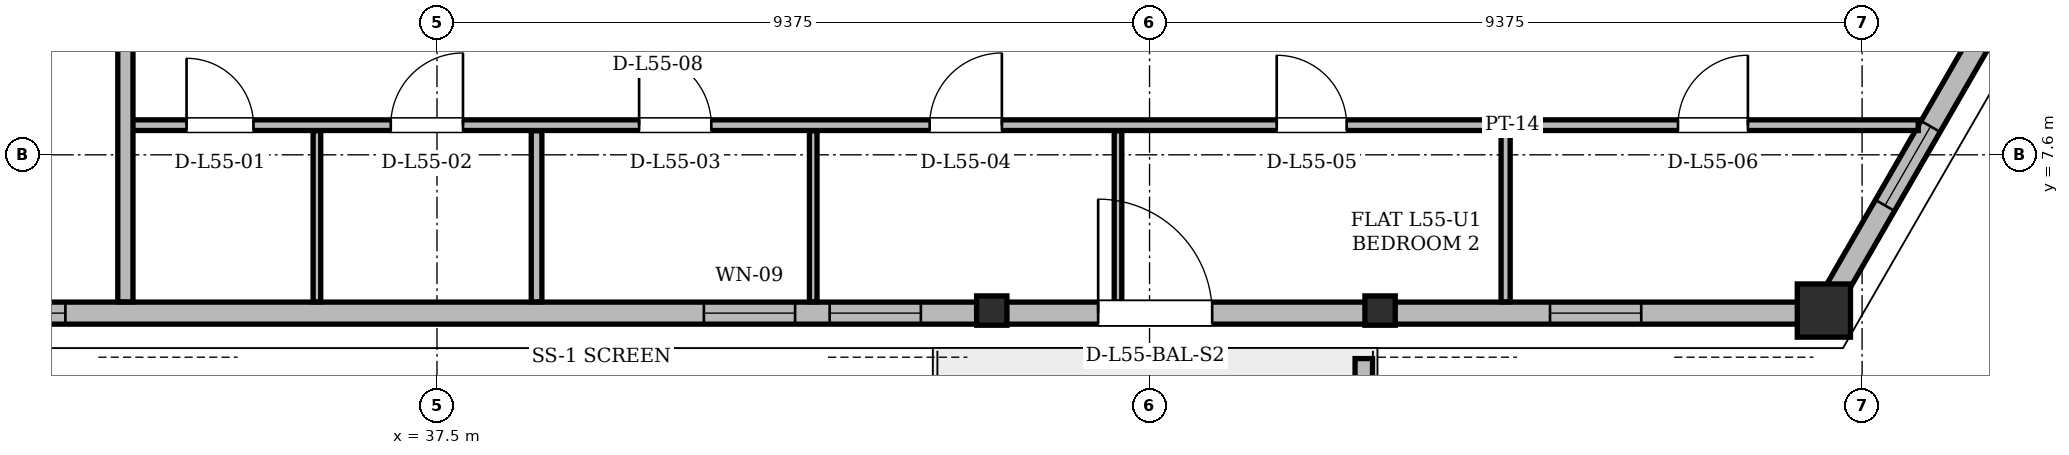
"""IFC4 building model, lengths in metres.
Left out: names, types, materials, properties, quantities, classifications, styles, units other than length and angle.
Written with IfcOpenShell. Run it as: python <this file> out.ifc"""

import sys

from ifc_helpers import new_model, si_unit, direction, frame, frame_2d, origin, origin_2d, place, context, subcontext, project, spatial, polyline, rectangle, hollow_rectangle, i_section, outline, extrude, element, fill, save


model = new_model("IFC4")
c1 = context("Model", 3, precision=1e-05, world=origin(), true_north=direction((0.0, 1.0)))
c2 = subcontext(c1, "Body", "Model", "MODEL_VIEW")
j1 = project(units=[si_unit("LENGTHUNIT", "METRE"), si_unit("PLANEANGLEUNIT", "RADIAN")], contexts=[c1])
p1 = place(None, origin())
s1 = spatial("IfcSite", under=j1, at=p1, CompositionType="ELEMENT")
p2 = place(p1, origin())
s2 = spatial("IfcBuilding", under=s1, at=p2, CompositionType="ELEMENT")
p3 = place(p2, frame((0.0, 0.0, 209.1)))
s3 = spatial("IfcBuildingStorey", under=s2, at=p3, CompositionType="ELEMENT", Elevation=209.1)
p4 = place(p3, frame((55.733, 5.517, 0.004), z_axis=(0.007884695021, 0.01876013643, 0.999792922992), x_axis=(-0.921886676673, 0.387459617732, 0.0)))
e1 = element("IfcColumn", 1, at=p4, inside=s3, PredefinedType="COLUMN", context=c2, shape_type="SweptSolid", body=[
    extrude(hollow_rectangle(XDim=0.7, YDim=0.7, WallThickness=0.055, at=origin_2d()), origin(), (0.0, 0.0, 1.0), 3.592),
])
for number, where, z_axis, x_axis in (
    (2, (44.793, 5.517, 0.004), (0.003, 0.019, 1.0), (-0.986, 0.168, 0.0)),
    (3, (49.899, 5.517, 0.004), (0.005, 0.019, 1.0), (-0.962, 0.272, 0.0)),
):
    element("IfcColumn", number, at=place(p3, frame(where, z_axis=z_axis, x_axis=x_axis)), inside=s3, PredefinedType="COLUMN", context=c2, shape_type="SweptSolid", body=[
        extrude(i_section(OverallWidth=0.399, OverallDepth=0.386, WebThickness=0.021, FlangeThickness=0.033, at=origin_2d()), origin(), (0.0, 0.0, 1.0), 3.592),
    ])
p5 = place(p3, frame((19.267, 5.517, 0.0), z_axis=(0.0, 0.0, 1.0), x_axis=(1.0, 0.0, 0.0)))
e4 = element("IfcWall", 4, at=p5, inside=s3, PredefinedType="SOLIDWALL", context=c2, shape_type="SweptSolid", body=[
    extrude(rectangle(XDim=36.466, YDim=0.29, at=frame_2d((18.233, 0.0))), origin(), (0.0, 0.0, 1.0), 2.677),
])
p6 = place(p5, frame((3.639, 0.0, 0.0)))
e5 = element("IfcOpeningElement", 5, at=p6, cuts=e4, PredefinedType="OPENING", context=c2, shape_type="SweptSolid", body=[
    extrude(rectangle(XDim=1.5, YDim=2.2, at=frame_2d((0.75, 1.1))), frame((0.0, 0.145, 0.0), z_axis=(0.0, -1.0, 0.0), x_axis=(1.0, 0.0, 0.0)), (0.0, 0.0, 1.0), 0.29),
])
p7 = place(p5, frame((26.932, 0.0, 0.0)))
e6 = element("IfcOpeningElement", 6, at=p7, cuts=e4, PredefinedType="OPENING", context=c2, shape_type="SweptSolid", body=[
    extrude(rectangle(XDim=1.5, YDim=2.2, at=frame_2d((0.75, 1.1))), frame((0.0, 0.145, 0.0), z_axis=(0.0, -1.0, 0.0), x_axis=(1.0, 0.0, 0.0)), (0.0, 0.0, 1.0), 0.29),
])
p8 = place(p5, frame((21.745, 0.0, 0.85)))
e7 = element("IfcOpeningElement", 7, at=p8, cuts=e4, PredefinedType="OPENING", context=c2, shape_type="SweptSolid", body=[
    extrude(rectangle(XDim=1.2, YDim=1.48, at=frame_2d((0.6, 0.74))), frame((0.0, 0.145, 0.0), z_axis=(0.0, -1.0, 0.0), x_axis=(1.0, 0.0, 0.0)), (0.0, 0.0, 1.0), 0.29),
])
p9 = place(p5, frame((23.399, 0.0, 0.85)))
e8 = element("IfcOpeningElement", 8, at=p9, cuts=e4, PredefinedType="OPENING", context=c2, shape_type="SweptSolid", body=[
    extrude(rectangle(XDim=1.2, YDim=1.48, at=frame_2d((0.6, 0.74))), frame((0.0, 0.145, 0.0), z_axis=(0.0, -1.0, 0.0), x_axis=(1.0, 0.0, 0.0)), (0.0, 0.0, 1.0), 0.29),
])
p10 = place(p5, frame((32.877, 0.0, 0.85)))
e9 = element("IfcOpeningElement", 9, at=p10, cuts=e4, PredefinedType="OPENING", context=c2, shape_type="SweptSolid", body=[
    extrude(rectangle(XDim=1.2, YDim=1.48, at=frame_2d((0.6, 0.74))), frame((0.0, 0.145, 0.0), z_axis=(0.0, -1.0, 0.0), x_axis=(1.0, 0.0, 0.0)), (0.0, 0.0, 1.0), 0.29),
])
p11 = place(p5, frame((1.674, 0.0, 0.85)))
e10 = element("IfcOpeningElement", 10, at=p11, cuts=e4, PredefinedType="OPENING", context=c2, shape_type="SweptSolid", body=[
    extrude(rectangle(XDim=1.2, YDim=1.48, at=frame_2d((0.6, 0.74))), frame((0.0, 0.145, 0.0), z_axis=(0.0, -1.0, 0.0), x_axis=(1.0, 0.0, 0.0)), (0.0, 0.0, 1.0), 0.29),
])
p12 = place(p5, frame((12.144, 0.0, 0.85)))
e11 = element("IfcOpeningElement", 11, at=p12, cuts=e4, PredefinedType="OPENING", context=c2, shape_type="SweptSolid", body=[
    extrude(rectangle(XDim=1.2, YDim=1.48, at=frame_2d((0.6, 0.74))), frame((0.0, 0.145, 0.0), z_axis=(0.0, -1.0, 0.0), x_axis=(1.0, 0.0, 0.0)), (0.0, 0.0, 1.0), 0.29),
])
p13 = place(p3, frame((55.733, 5.517, 0.0), z_axis=(0.0, 0.0, 1.0), x_axis=(0.500015274395, 0.866016584929, 0.0)))
e12 = element("IfcWall", 12, at=p13, inside=s3, PredefinedType="SOLIDWALL", context=c2, shape_type="SweptSolid", body=[
    extrude(rectangle(XDim=7.025, YDim=0.29, at=frame_2d((3.512, 0.0))), origin(), (0.0, 0.0, 1.0), 2.677),
])
p14 = place(p13, frame((1.636, 0.0, 0.85)))
e13 = element("IfcOpeningElement", 13, at=p14, cuts=e12, PredefinedType="OPENING", context=c2, shape_type="SweptSolid", body=[
    extrude(rectangle(XDim=1.2, YDim=1.48, at=frame_2d((0.6, 0.74))), frame((0.0, 0.145, 0.0), z_axis=(0.0, -1.0, 0.0), x_axis=(1.0, 0.0, 0.0)), (0.0, 0.0, 1.0), 0.29),
])
p15 = place(p3, frame((49.694, 4.919, 0.0), z_axis=(0.0, 0.0, 1.0), x_axis=(0.0, -1.0, 0.0)))
e14 = element("IfcWall", 14, at=p15, inside=s3, PredefinedType="PARAPET", context=c2, shape_type="SweptSolid", body=[
    extrude(outline(polyline([(0.0, 0.0), (2.042, 0.0), (2.042, 1.1), (0.0, 1.32), (0.0, 0.0)])), frame((0.0, 0.115, 0.0), z_axis=(0.0, -1.0, 0.0), x_axis=(1.0, 0.0, 0.0)), (0.0, 0.0, 1.0), 0.23),
])
p16 = place(p3, frame((33.35, 7.99, 0.0), z_axis=(0.0, 0.0, 1.0), x_axis=(1.0, 0.0, 0.0)))
e15 = element("IfcWall", 15, at=p16, inside=s3, PredefinedType="PARTITIONING", context=c2, shape_type="SweptSolid", body=[
    extrude(rectangle(XDim=23.639, YDim=0.14, at=frame_2d((11.819, 0.0))), origin(), (0.0, 0.0, 1.0), 2.913),
])
p17 = place(p16, frame((0.855, 0.0, 0.0)))
e16 = element("IfcOpeningElement", 16, at=p17, cuts=e15, PredefinedType="OPENING", context=c2, shape_type="SweptSolid", body=[
    extrude(rectangle(XDim=0.88, YDim=2.08, at=frame_2d((0.44, 1.04))), frame((0.0, 0.07, 0.0), z_axis=(0.0, -1.0, 0.0), x_axis=(1.0, 0.0, 0.0)), (0.0, 0.0, 1.0), 0.14),
])
p18 = place(p16, frame((3.542, 0.0, 0.0)))
e17 = element("IfcOpeningElement", 17, at=p18, cuts=e15, PredefinedType="OPENING", context=c2, shape_type="SweptSolid", body=[
    extrude(rectangle(XDim=0.95, YDim=2.1, at=frame_2d((0.475, 1.05))), frame((0.0, 0.07, 0.0), z_axis=(0.0, -1.0, 0.0), x_axis=(1.0, 0.0, 0.0)), (0.0, 0.0, 1.0), 0.14),
])
p19 = place(p16, frame((6.809, 0.0, 0.0)))
e18 = element("IfcOpeningElement", 18, at=p19, cuts=e15, PredefinedType="OPENING", context=c2, shape_type="SweptSolid", body=[
    extrude(rectangle(XDim=0.95, YDim=2.1, at=frame_2d((0.475, 1.05))), frame((0.0, 0.07, 0.0), z_axis=(0.0, -1.0, 0.0), x_axis=(1.0, 0.0, 0.0)), (0.0, 0.0, 1.0), 0.14),
])
p20 = place(p16, frame((10.632, 0.0, 0.0)))
e19 = element("IfcOpeningElement", 19, at=p20, cuts=e15, PredefinedType="OPENING", context=c2, shape_type="SweptSolid", body=[
    extrude(rectangle(XDim=0.95, YDim=2.1, at=frame_2d((0.475, 1.05))), frame((0.0, 0.07, 0.0), z_axis=(0.0, -1.0, 0.0), x_axis=(1.0, 0.0, 0.0)), (0.0, 0.0, 1.0), 0.14),
])
p21 = place(p16, frame((15.198, 0.0, 0.0)))
e20 = element("IfcOpeningElement", 20, at=p21, cuts=e15, PredefinedType="OPENING", context=c2, shape_type="SweptSolid", body=[
    extrude(rectangle(XDim=0.92, YDim=2.12, at=frame_2d((0.46, 1.06))), frame((0.0, 0.07, 0.0), z_axis=(0.0, -1.0, 0.0), x_axis=(1.0, 0.0, 0.0)), (0.0, 0.0, 1.0), 0.14),
])
p22 = place(p16, frame((20.478, 0.0, 0.0)))
e21 = element("IfcOpeningElement", 21, at=p22, cuts=e15, PredefinedType="OPENING", context=c2, shape_type="SweptSolid", body=[
    extrude(rectangle(XDim=0.92, YDim=2.12, at=frame_2d((0.46, 1.06))), frame((0.0, 0.07, 0.0), z_axis=(0.0, -1.0, 0.0), x_axis=(1.0, 0.0, 0.0)), (0.0, 0.0, 1.0), 0.14),
])
p23 = place(p3, frame((33.4, 5.666, 0.0), z_axis=(0.0, 0.0, 1.0), x_axis=(0.0, 1.0, 0.0)))
e22 = element("IfcWall", 22, at=p23, inside=s3, PredefinedType="PARTITIONING", context=c2, shape_type="SweptSolid", body=[
    extrude(rectangle(XDim=3.53, YDim=0.2, at=frame_2d((1.765, 0.0))), origin(), (0.0, 0.0, 1.0), 3.38),
])
p24 = place(p3, frame((35.92, 5.666, 0.0), z_axis=(0.0, 0.0, 1.0), x_axis=(0.0, 1.0, 0.0)))
e23 = element("IfcWall", 23, at=p24, inside=s3, PredefinedType="PARTITIONING", context=c2, shape_type="SweptSolid", body=[
    extrude(rectangle(XDim=2.25, YDim=0.1, at=frame_2d((1.125, 0.0))), origin(), (0.0, 0.0, 1.0), 3.38),
])
p25 = place(p3, frame((38.81, 5.666, 0.0), z_axis=(0.0, 0.0, 1.0), x_axis=(0.0, 1.0, 0.0)))
e24 = element("IfcWall", 24, at=p25, inside=s3, PredefinedType="PARTITIONING", context=c2, shape_type="SweptSolid", body=[
    extrude(rectangle(XDim=2.25, YDim=0.14, at=frame_2d((1.125, 0.0))), origin(), (0.0, 0.0, 1.0), 3.38),
])
for number, where, z_axis, x_axis in (
    (25, (42.45, 5.666, 0.0), (0.0, 0.0, 1.0), (0.0, 1.0, 0.0)),
    (26, (46.46, 5.666, 0.0), (0.0, 0.0, 1.0), (0.0, 1.0, 0.0)),
):
    element("IfcWall", number, at=place(p3, frame(where, z_axis=z_axis, x_axis=x_axis)), inside=s3, PredefinedType="PARTITIONING", context=c2, shape_type="SweptSolid", body=[
        extrude(rectangle(XDim=2.25, YDim=0.1, at=frame_2d((1.125, 0.0))), origin(), (0.0, 0.0, 1.0), 3.38),
    ])
p26 = place(p3, frame((51.56, 5.666, 0.0), z_axis=(0.0, 0.0, 1.0), x_axis=(0.0, 1.0, 0.0)))
e27 = element("IfcWall", 27, at=p26, inside=s3, PredefinedType="PARTITIONING", context=c2, shape_type="SweptSolid", body=[
    extrude(rectangle(XDim=2.25, YDim=0.12, at=frame_2d((1.125, 0.0))), origin(), (0.0, 0.0, 1.0), 3.38),
])
p27 = place(p7, origin())
e28 = element("IfcDoor", 28, at=p27, inside=s3, OperationType="SINGLE_SWING_LEFT", PredefinedType="DOOR", context=c2, shape_type="SweptSolid", body=[
    extrude(rectangle(XDim=1.5, YDim=2.2, at=frame_2d((0.75, 1.1))), frame((0.0, 0.025, 0.0), z_axis=(0.0, -1.0, 0.0), x_axis=(1.0, 0.0, 0.0)), (0.0, 0.0, 1.0), 0.05),
])
fill(e6, e28)
p28 = place(p8, origin())
e29 = element("IfcWindow", 29, at=p28, inside=s3, PartitioningType="SINGLE_PANEL", PredefinedType="WINDOW", context=c2, shape_type="SweptSolid", body=[
    extrude(rectangle(XDim=1.2, YDim=1.48, at=frame_2d((0.6, 0.74))), frame((0.0, 0.03, 0.0), z_axis=(0.0, -1.0, 0.0), x_axis=(1.0, 0.0, 0.0)), (0.0, 0.0, 1.0), 0.06),
])
fill(e7, e29)
p29 = place(p9, origin())
e30 = element("IfcWindow", 30, at=p29, inside=s3, PartitioningType="SINGLE_PANEL", PredefinedType="WINDOW", context=c2, shape_type="SweptSolid", body=[
    extrude(rectangle(XDim=1.2, YDim=1.48, at=frame_2d((0.6, 0.74))), frame((0.0, 0.03, 0.0), z_axis=(0.0, -1.0, 0.0), x_axis=(1.0, 0.0, 0.0)), (0.0, 0.0, 1.0), 0.06),
])
fill(e8, e30)
p30 = place(p10, origin())
e31 = element("IfcWindow", 31, at=p30, inside=s3, PartitioningType="SINGLE_PANEL", PredefinedType="WINDOW", context=c2, shape_type="SweptSolid", body=[
    extrude(rectangle(XDim=1.2, YDim=1.48, at=frame_2d((0.6, 0.74))), frame((0.0, 0.03, 0.0), z_axis=(0.0, -1.0, 0.0), x_axis=(1.0, 0.0, 0.0)), (0.0, 0.0, 1.0), 0.06),
])
fill(e9, e31)
p31 = place(p12, origin())
e32 = element("IfcWindow", 32, at=p31, inside=s3, PartitioningType="SINGLE_PANEL", PredefinedType="WINDOW", context=c2, shape_type="SweptSolid", body=[
    extrude(rectangle(XDim=1.2, YDim=1.48, at=frame_2d((0.6, 0.74))), frame((0.0, 0.03, 0.0), z_axis=(0.0, -1.0, 0.0), x_axis=(1.0, 0.0, 0.0)), (0.0, 0.0, 1.0), 0.06),
])
fill(e11, e32)
p32 = place(p14, origin())
e33 = element("IfcWindow", 33, at=p32, inside=s3, PartitioningType="SINGLE_PANEL", PredefinedType="WINDOW", context=c2, shape_type="SweptSolid", body=[
    extrude(rectangle(XDim=1.2, YDim=1.48, at=frame_2d((0.6, 0.74))), frame((0.0, 0.03, 0.0), z_axis=(0.0, -1.0, 0.0), x_axis=(1.0, 0.0, 0.0)), (0.0, 0.0, 1.0), 0.06),
])
fill(e13, e33)
p33 = place(p17, origin())
e34 = element("IfcDoor", 34, at=p33, inside=s3, OperationType="SINGLE_SWING_LEFT", PredefinedType="DOOR", context=c2, shape_type="SweptSolid", body=[
    extrude(rectangle(XDim=0.88, YDim=2.08, at=frame_2d((0.44, 1.04))), frame((0.0, 0.025, 0.0), z_axis=(0.0, -1.0, 0.0), x_axis=(1.0, 0.0, 0.0)), (0.0, 0.0, 1.0), 0.05),
])
fill(e16, e34)
p34 = place(p18, origin())
e35 = element("IfcDoor", 35, at=p34, inside=s3, OperationType="SINGLE_SWING_RIGHT", PredefinedType="DOOR", context=c2, shape_type="SweptSolid", body=[
    extrude(rectangle(XDim=0.95, YDim=2.1, at=frame_2d((0.475, 1.05))), frame((0.0, 0.025, 0.0), z_axis=(0.0, -1.0, 0.0), x_axis=(1.0, 0.0, 0.0)), (0.0, 0.0, 1.0), 0.05),
])
fill(e17, e35)
p35 = place(p19, origin())
e36 = element("IfcDoor", 36, at=p35, inside=s3, OperationType="SINGLE_SWING_LEFT", PredefinedType="DOOR", context=c2, shape_type="SweptSolid", body=[
    extrude(rectangle(XDim=0.95, YDim=2.1, at=frame_2d((0.475, 1.05))), frame((0.0, 0.025, 0.0), z_axis=(0.0, -1.0, 0.0), x_axis=(1.0, 0.0, 0.0)), (0.0, 0.0, 1.0), 0.05),
])
fill(e18, e36)
p36 = place(p20, origin())
e37 = element("IfcDoor", 37, at=p36, inside=s3, OperationType="SINGLE_SWING_RIGHT", PredefinedType="DOOR", context=c2, shape_type="SweptSolid", body=[
    extrude(rectangle(XDim=0.95, YDim=2.1, at=frame_2d((0.475, 1.05))), frame((0.0, 0.025, 0.0), z_axis=(0.0, -1.0, 0.0), x_axis=(1.0, 0.0, 0.0)), (0.0, 0.0, 1.0), 0.05),
])
fill(e19, e37)
p37 = place(p21, origin())
e38 = element("IfcDoor", 38, at=p37, inside=s3, OperationType="SINGLE_SWING_LEFT", PredefinedType="DOOR", context=c2, shape_type="SweptSolid", body=[
    extrude(rectangle(XDim=0.92, YDim=2.12, at=frame_2d((0.46, 1.06))), frame((0.0, 0.025, 0.0), z_axis=(0.0, -1.0, 0.0), x_axis=(1.0, 0.0, 0.0)), (0.0, 0.0, 1.0), 0.05),
])
fill(e20, e38)
p38 = place(p22, origin())
e39 = element("IfcDoor", 39, at=p38, inside=s3, OperationType="SINGLE_SWING_RIGHT", PredefinedType="DOOR", context=c2, shape_type="SweptSolid", body=[
    extrude(rectangle(XDim=0.92, YDim=2.12, at=frame_2d((0.46, 1.06))), frame((0.0, 0.025, 0.0), z_axis=(0.0, -1.0, 0.0), x_axis=(1.0, 0.0, 0.0)), (0.0, 0.0, 1.0), 0.05),
])
fill(e21, e39)
save(model, sys.argv[1])
